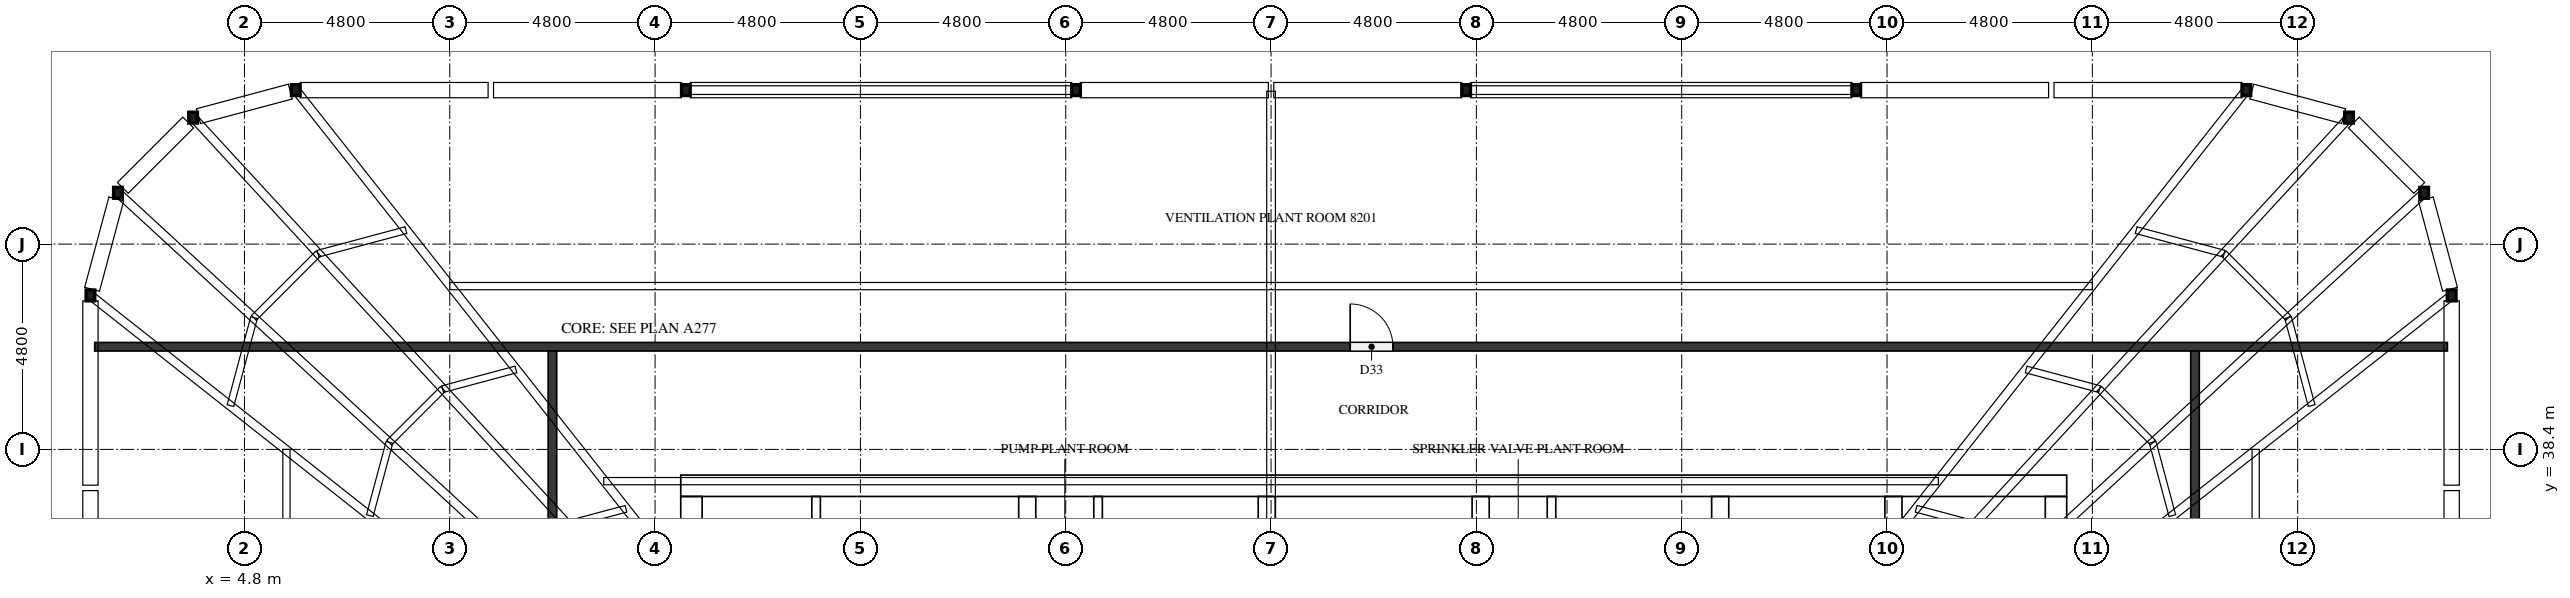
"""IFC4 building model, lengths in metres.
Left out: names, types, materials, properties, quantities, classifications, styles, units other than length and angle.
Written with IfcOpenShell. Run it as: python <this file> out.ifc"""

import sys

from ifc_helpers import new_model, si_unit, direction, frame, frame_2d, origin, origin_2d, place, context, subcontext, project, spatial, rectangle, hollow_rectangle, extrude, element, fill, save


model = new_model("IFC4")
c1 = context("Model", 3, precision=1e-05, world=origin(), true_north=direction((0.0, 1.0)))
c2 = subcontext(c1, "Body", "Model", "MODEL_VIEW")
j1 = project(units=[si_unit("LENGTHUNIT", "METRE"), si_unit("PLANEANGLEUNIT", "RADIAN")], contexts=[c1])
p1 = place(None, origin())
s1 = spatial("IfcSite", under=j1, at=p1, CompositionType="ELEMENT")
p2 = place(p1, origin())
s2 = spatial("IfcBuilding", under=s1, at=p2, CompositionType="ELEMENT")
p3 = place(p2, frame((0.0, 0.0, 317.3)))
s3 = spatial("IfcBuildingStorey", under=s2, at=p3, CompositionType="ELEMENT", Elevation=317.3)
p4 = place(p3, frame((15.0, 37.55, 0.0), z_axis=(0.0, 0.0, 1.0), x_axis=(1.0, 0.0, 0.0)))
e1 = element("IfcWall", 1, at=p4, inside=s3, PredefinedType="SHEAR", context=c2, shape_type="SweptSolid", body=[
    extrude(rectangle(XDim=32.4, YDim=0.5, at=frame_2d((16.2, 0.0))), origin(), (0.0, 0.0, 1.0), 3.0),
])
p5 = place(p4, frame((15.3, 0.0, 0.0)))
e2 = element("IfcOpeningElement", 2, at=p5, cuts=e1, PredefinedType="OPENING", context=c2, shape_type="SweptSolid", body=[
    extrude(rectangle(XDim=1.8, YDim=2.1, at=frame_2d((0.9, 1.05))), frame((0.0, 0.26, 0.0), z_axis=(0.0, -1.0, 0.0), x_axis=(1.0, 0.0, 0.0)), (0.0, 0.0, 1.0), 0.52),
])
p6 = place(p4, frame((1.282, 0.0, 0.0)))
e3 = element("IfcOpeningElement", 3, at=p6, cuts=e1, PredefinedType="OPENING", context=c2, shape_type="SweptSolid", body=[
    extrude(rectangle(XDim=1.0, YDim=2.1, at=frame_2d((0.5, 1.05))), frame((0.0, 0.26, 0.0), z_axis=(0.0, -1.0, 0.0), x_axis=(1.0, 0.0, 0.0)), (0.0, 0.0, 1.0), 0.52),
])
p7 = place(p4, frame((5.082, 0.0, 0.0)))
e4 = element("IfcOpeningElement", 4, at=p7, cuts=e1, PredefinedType="OPENING", context=c2, shape_type="SweptSolid", body=[
    extrude(rectangle(XDim=1.0, YDim=2.1, at=frame_2d((0.5, 1.05))), frame((0.0, 0.26, 0.0), z_axis=(0.0, -1.0, 0.0), x_axis=(1.0, 0.0, 0.0)), (0.0, 0.0, 1.0), 0.52),
])
p8 = place(p3, frame((15.25, 15.5, 0.0), z_axis=(0.0, 0.0, 1.0), x_axis=(0.0, 1.0, 0.0)))
e5 = element("IfcWall", 5, at=p8, inside=s3, PredefinedType="SHEAR", context=c2, shape_type="SweptSolid", body=[
    extrude(rectangle(XDim=21.8, YDim=0.5, at=frame_2d((10.9, 0.0))), origin(), (0.0, 0.0, 1.0), 3.0),
])
p9 = place(p8, frame((5.26, 0.0, 0.0)))
e6 = element("IfcOpeningElement", 6, at=p9, cuts=e5, PredefinedType="OPENING", context=c2, shape_type="SweptSolid", body=[
    extrude(rectangle(XDim=1.2, YDim=2.1, at=frame_2d((0.6, 1.05))), frame((0.0, 0.26, 0.0), z_axis=(0.0, -1.0, 0.0), x_axis=(1.0, 0.0, 0.0)), (0.0, 0.0, 1.0), 0.52),
])
p10 = place(p3, frame((47.15, 15.5, 0.0), z_axis=(0.0, 0.0, 1.0), x_axis=(0.0, 1.0, 0.0)))
e7 = element("IfcWall", 7, at=p10, inside=s3, PredefinedType="SHEAR", context=c2, shape_type="SweptSolid", body=[
    extrude(rectangle(XDim=21.8, YDim=0.5, at=frame_2d((10.9, 0.0))), origin(), (0.0, 0.0, 1.0), 3.0),
])
p11 = place(p10, frame((10.6, 0.0, 0.0)))
e8 = element("IfcOpeningElement", 8, at=p11, cuts=e7, PredefinedType="OPENING", context=c2, shape_type="SweptSolid", body=[
    extrude(rectangle(XDim=1.2, YDim=2.1, at=frame_2d((0.6, 1.05))), frame((0.0, 0.26, 0.0), z_axis=(0.0, -1.0, 0.0), x_axis=(1.0, 0.0, 0.0)), (0.0, 0.0, 1.0), 0.52),
])
p12 = place(p3, frame((23.1, 15.5, 0.0), z_axis=(0.0, 0.0, 1.0), x_axis=(0.0, 1.0, 0.0)))
e9 = element("IfcWall", 9, at=p12, inside=s3, PredefinedType="SHEAR", context=c2, shape_type="SweptSolid", body=[
    extrude(rectangle(XDim=21.8, YDim=0.4, at=frame_2d((10.9, 0.0))), origin(), (0.0, 0.0, 1.0), 3.0),
])
p13 = place(p3, frame((39.3, 27.75, 0.0), z_axis=(0.0, 0.0, 1.0), x_axis=(0.0, 1.0, 0.0)))
e10 = element("IfcWall", 10, at=p13, inside=s3, PredefinedType="SHEAR", context=c2, shape_type="SweptSolid", body=[
    extrude(rectangle(XDim=9.55, YDim=0.4, at=frame_2d((4.775, 0.0))), origin(), (0.0, 0.0, 1.0), 3.0),
])
p14 = place(p3, frame((43.35, 27.75, 0.0), z_axis=(0.0, 0.0, 1.0), x_axis=(0.0, 1.0, 0.0)))
e11 = element("IfcWall", 11, at=p14, inside=s3, PredefinedType="SHEAR", context=c2, shape_type="SweptSolid", body=[
    extrude(rectangle(XDim=9.55, YDim=0.4, at=frame_2d((4.775, 0.0))), origin(), (0.0, 0.0, 1.0), 3.0),
])
p15 = place(p14, frame((7.65, 0.0, 0.0)))
e12 = element("IfcOpeningElement", 12, at=p15, cuts=e11, PredefinedType="OPENING", context=c2, shape_type="SweptSolid", body=[
    extrude(rectangle(XDim=1.2, YDim=2.1, at=frame_2d((0.6, 1.05))), frame((0.0, 0.21, 0.0), z_axis=(0.0, -1.0, 0.0), x_axis=(1.0, 0.0, 0.0)), (0.0, 0.0, 1.0), 0.42),
])
for number, where, z_axis, x_axis in (
    (13, (28.7, 33.75, 0.0), (0.0, 0.0, 1.0), (0.0, 1.0, 0.0)),
    (14, (33.7, 33.75, 0.0), (0.0, 0.0, 1.0), (0.0, 1.0, 0.0)),
):
    element("IfcWall", number, at=place(p3, frame(where, z_axis=z_axis, x_axis=x_axis)), inside=s3, PredefinedType="SHEAR", context=c2, shape_type="SweptSolid", body=[
        extrude(rectangle(XDim=3.55, YDim=0.4, at=frame_2d((1.775, 0.0))), origin(), (0.0, 0.0, 1.0), 3.0),
    ])
for number, where, z_axis, x_axis in (
    (15, (56.4, 42.0, 0.0), (0.0, 0.0, 1.0), (1.0, 0.0, 0.0)),
    (16, (55.757, 44.4, 0.0), (0.0, 0.0, 1.0), (1.0, 0.0, 0.0)),
    (17, (54.0, 46.157, 0.0), (0.0, 0.0, 1.0), (1.0, 0.0, 0.0)),
    (18, (51.6, 46.8, 0.0), (0.0, 0.0, 1.0), (1.0, 0.0, 0.0)),
    (19, (42.48, 46.8, 0.0), (0.0, 0.0, 1.0), (1.0, 0.0, 0.0)),
    (20, (33.36, 46.8, 0.0), (0.0, 0.0, 1.0), (1.0, 0.0, 0.0)),
    (21, (24.24, 46.8, 0.0), (0.0, 0.0, 1.0), (1.0, 0.0, 0.0)),
    (22, (15.12, 46.8, 0.0), (0.0, 0.0, 1.0), (1.0, 0.0, 0.0)),
    (23, (6.0, 46.8, 0.0), (0.0, 0.0, 1.0), (1.0, 0.0, 0.0)),
    (24, (3.6, 46.157, 0.0), (0.0, 0.0, 1.0), (1.0, 0.0, 0.0)),
    (25, (1.843, 44.4, 0.0), (0.0, 0.0, 1.0), (1.0, 0.0, 0.0)),
    (26, (1.2, 42.0, 0.0), (0.0, 0.0, 1.0), (1.0, 0.0, 0.0)),
):
    element("IfcColumn", number, at=place(p3, frame(where, z_axis=z_axis, x_axis=x_axis)), inside=s3, PredefinedType="COLUMN", context=c2, shape_type="SweptSolid", body=[
        extrude(hollow_rectangle(XDim=0.203, YDim=0.254, WallThickness=0.01, InnerFilletRadius=0.004, OuterFilletRadius=0.013, at=origin_2d()), origin(), (0.0, 0.0, 1.0), 3.0),
    ])
p16 = place(p3, frame((18.164, 31.45, 0.0), z_axis=(0.0, 0.0, 1.0), x_axis=(0.0, 1.0, 0.0)))
e27 = element("IfcWall", 27, at=p16, inside=s3, PredefinedType="PARTITIONING", context=c2, shape_type="SweptSolid", body=[
    extrude(rectangle(XDim=5.85, YDim=0.2, at=frame_2d((2.925, 0.0))), origin(), (0.0, 0.0, 1.0), 3.0),
])
for number, where, z_axis, x_axis in (
    (28, (24.756, 33.75, 0.0), (0.0, 0.0, 1.0), (0.0, 1.0, 0.0)),
    (29, (35.356, 33.75, 0.0), (0.0, 0.0, 1.0), (0.0, 1.0, 0.0)),
):
    element("IfcWall", number, at=place(p3, frame(where, z_axis=z_axis, x_axis=x_axis)), inside=s3, PredefinedType="PARTITIONING", context=c2, shape_type="SweptSolid", body=[
        extrude(rectangle(XDim=3.55, YDim=0.2, at=frame_2d((1.775, 0.0))), origin(), (0.0, 0.0, 1.0), 3.0),
    ])
p17 = place(p3, frame((1.3, 40.8, 0.0), z_axis=(0.0, 0.0, 1.0), x_axis=(1.0, 0.0, 0.0)))
e30 = element("IfcWall", 30, at=p17, inside=s3, PredefinedType="PARTITIONING", context=c2, shape_type="SweptSolid", body=[
    extrude(rectangle(XDim=55.0, YDim=0.2, at=frame_2d((27.5, 0.0))), origin(), (0.0, 0.0, 1.0), 3.0),
])
p18 = place(p17, frame((29.35, 0.0, 0.0)))
e31 = element("IfcOpeningElement", 31, at=p18, cuts=e30, PredefinedType="OPENING", context=c2, shape_type="SweptSolid", body=[
    extrude(rectangle(XDim=1.0, YDim=2.1, at=frame_2d((0.5, 1.05))), frame((0.0, 0.11, 0.0), z_axis=(0.0, -1.0, 0.0), x_axis=(1.0, 0.0, 0.0)), (0.0, 0.0, 1.0), 0.22),
])
p19 = place(p3, frame((12.0, 12.1, 0.0), z_axis=(0.0, 0.0, 1.0), x_axis=(0.0, 1.0, 0.0)))
e32 = element("IfcWall", 32, at=p19, inside=s3, PredefinedType="PARTITIONING", context=c2, shape_type="SweptSolid", body=[
    extrude(rectangle(XDim=28.6, YDim=0.2, at=frame_2d((14.3, 0.0))), origin(), (0.0, 0.0, 1.0), 3.0),
])
p20 = place(p19, frame((13.75, 0.0, 0.0)))
e33 = element("IfcOpeningElement", 33, at=p20, cuts=e32, PredefinedType="OPENING", context=c2, shape_type="SweptSolid", body=[
    extrude(rectangle(XDim=1.0, YDim=2.1, at=frame_2d((0.5, 1.05))), frame((0.0, 0.11, 0.0), z_axis=(0.0, -1.0, 0.0), x_axis=(1.0, 0.0, 0.0)), (0.0, 0.0, 1.0), 0.22),
])
p21 = place(p3, frame((50.4, 40.7, 0.0), z_axis=(0.0, 0.0, 1.0), x_axis=(0.0, -1.0, 0.0)))
e34 = element("IfcWall", 34, at=p21, inside=s3, PredefinedType="PARTITIONING", context=c2, shape_type="SweptSolid", body=[
    extrude(rectangle(XDim=28.6, YDim=0.2, at=frame_2d((14.3, 0.0))), origin(), (0.0, 0.0, 1.0), 3.0),
])
p22 = place(p21, frame((13.75, 0.0, 0.0)))
e35 = element("IfcOpeningElement", 35, at=p22, cuts=e34, PredefinedType="OPENING", context=c2, shape_type="SweptSolid", body=[
    extrude(rectangle(XDim=1.0, YDim=2.1, at=frame_2d((0.5, 1.05))), frame((0.0, 0.11, 0.0), z_axis=(0.0, -1.0, 0.0), x_axis=(1.0, 0.0, 0.0)), (0.0, 0.0, 1.0), 0.22),
])
p23 = place(p5, origin())
e36 = element("IfcDoor", 36, at=p23, inside=s3, OperationType="DOUBLE_DOOR_SINGLE_SWING", PredefinedType="DOOR", context=c2, shape_type="SweptSolid", body=[
    extrude(rectangle(XDim=1.8, YDim=2.1, at=frame_2d((0.9, 1.05))), frame((0.0, 0.025, 0.0), z_axis=(0.0, -1.0, 0.0), x_axis=(1.0, 0.0, 0.0)), (0.0, 0.0, 1.0), 0.05),
])
fill(e2, e36)
p24 = place(p6, origin())
e37 = element("IfcDoor", 37, at=p24, inside=s3, OperationType="SINGLE_SWING_LEFT", PredefinedType="DOOR", context=c2, shape_type="SweptSolid", body=[
    extrude(rectangle(XDim=1.0, YDim=2.1, at=frame_2d((0.5, 1.05))), frame((0.0, 0.025, 0.0), z_axis=(0.0, -1.0, 0.0), x_axis=(1.0, 0.0, 0.0)), (0.0, 0.0, 1.0), 0.05),
])
fill(e3, e37)
p25 = place(p7, origin())
e38 = element("IfcDoor", 38, at=p25, inside=s3, OperationType="SINGLE_SWING_RIGHT", PredefinedType="DOOR", context=c2, shape_type="SweptSolid", body=[
    extrude(rectangle(XDim=1.0, YDim=2.1, at=frame_2d((0.5, 1.05))), frame((0.0, 0.025, 0.0), z_axis=(0.0, -1.0, 0.0), x_axis=(1.0, 0.0, 0.0)), (0.0, 0.0, 1.0), 0.05),
])
fill(e4, e38)
p26 = place(p18, origin())
e39 = element("IfcDoor", 39, at=p26, inside=s3, OperationType="SINGLE_SWING_LEFT", PredefinedType="DOOR", context=c2, shape_type="SweptSolid", body=[
    extrude(rectangle(XDim=1.0, YDim=2.1, at=frame_2d((0.5, 1.05))), frame((0.0, 0.025, 0.0), z_axis=(0.0, -1.0, 0.0), x_axis=(1.0, 0.0, 0.0)), (0.0, 0.0, 1.0), 0.05),
])
fill(e31, e39)
save(model, sys.argv[1])
